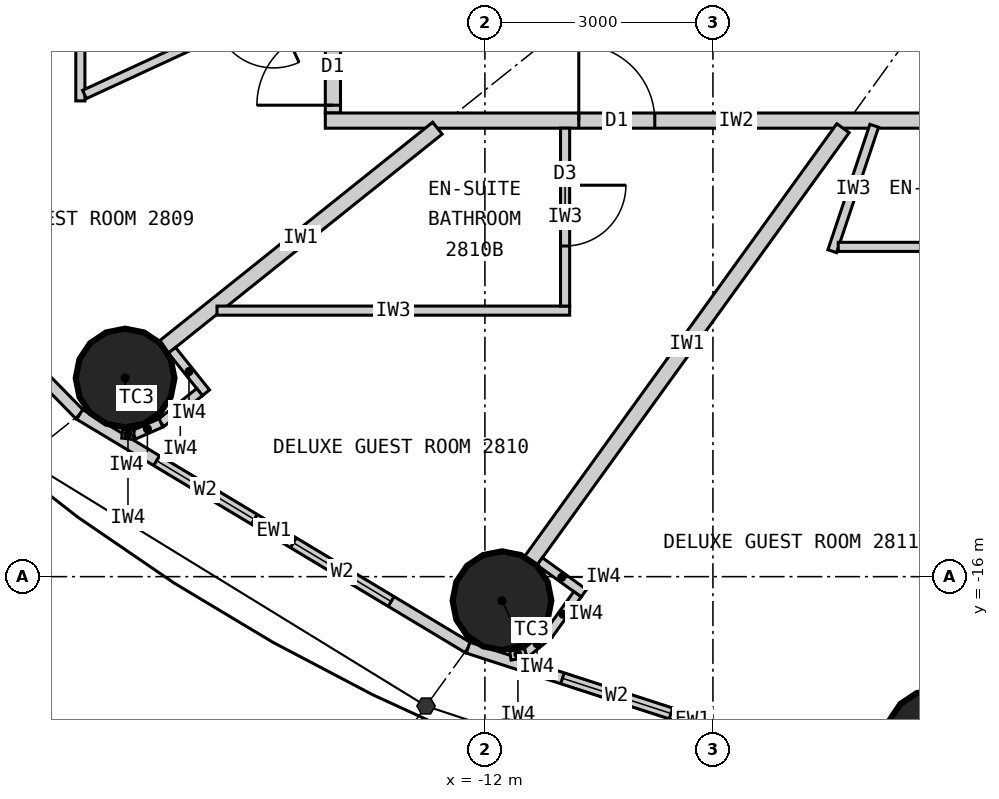
"""IFC4 building model, lengths in metres.
Left out: names, types, materials, properties, quantities, classifications, styles, units other than length and angle.
Written with IfcOpenShell. Run it as: python <this file> out.ifc"""

import sys

from ifc_helpers import new_model, si_unit, direction, frame, frame_2d, origin, origin_2d, place, context, subcontext, project, spatial, rectangle, circle, extrude, element, fill, save


model = new_model("IFC4")
c1 = context("Model", 3, precision=1e-05, world=origin(), true_north=direction((0.0, 1.0)))
c2 = subcontext(c1, "Body", "Model", "MODEL_VIEW")
j1 = project(units=[si_unit("LENGTHUNIT", "METRE"), si_unit("PLANEANGLEUNIT", "RADIAN")], contexts=[c1])
p1 = place(None, origin())
s1 = spatial("IfcSite", under=j1, at=p1, CompositionType="ELEMENT")
p2 = place(p1, origin())
s2 = spatial("IfcBuilding", under=s1, at=p2, CompositionType="ELEMENT")
p3 = place(p2, frame((0.0, 0.0, 112.2)))
s3 = spatial("IfcBuildingStorey", under=s2, at=p3, CompositionType="ELEMENT", Elevation=112.2)
for number, where, z_axis, x_axis in (
    (1, (-16.734, -13.387, 0.0), (0.0, 0.0, 1.0), (1.0, 0.0, 0.0)),
    (2, (-11.775, -16.316, 0.0), (0.0, 0.0, 1.0), (1.0, 0.0, 0.0)),
    (3, (-6.074, -18.135, 0.0), (0.0, 0.0, 1.0), (1.0, 0.0, 0.0)),
):
    element("IfcColumn", number, at=place(p3, frame(where, z_axis=z_axis, x_axis=x_axis)), inside=s3, PredefinedType="COLUMN", context=c2, shape_type="SweptSolid", body=[
        extrude(circle(Radius=0.65, at=origin_2d()), origin(), (0.0, 0.0, 1.0), 3.3),
    ])
p4 = place(p3, frame((-21.287, -9.832, 0.0), z_axis=(0.0, 0.0, 1.0), x_axis=(0.700136650834, -0.714008872605, 0.0)))
e4 = element("IfcWall", 4, at=p4, inside=s3, PredefinedType="ELEMENTEDWALL", context=c2, shape_type="SweptSolid", body=[
    extrude(rectangle(XDim=5.649, YDim=0.15, at=frame_2d((2.825, 0.0))), origin(), (0.0, 0.0, 1.0), 3.12),
])
p5 = place(p4, frame((1.025, 0.0, 0.9)))
e5 = element("IfcOpeningElement", 5, at=p5, cuts=e4, PredefinedType="OPENING", context=c2, shape_type="SweptSolid", body=[
    extrude(rectangle(XDim=1.5, YDim=1.9, at=frame_2d((0.75, 0.95))), frame((0.0, 0.085, 0.0), z_axis=(0.0, -1.0, 0.0), x_axis=(1.0, 0.0, 0.0)), (0.0, 0.0, 1.0), 0.17),
])
p6 = place(p4, frame((3.125, 0.0, 0.9)))
e6 = element("IfcOpeningElement", 6, at=p6, cuts=e4, PredefinedType="OPENING", context=c2, shape_type="SweptSolid", body=[
    extrude(rectangle(XDim=1.5, YDim=1.9, at=frame_2d((0.75, 0.95))), frame((0.0, 0.085, 0.0), z_axis=(0.0, -1.0, 0.0), x_axis=(1.0, 0.0, 0.0)), (0.0, 0.0, 1.0), 0.17),
])
p7 = place(p3, frame((-17.332, -13.866, 0.0), z_axis=(0.0, 0.0, 1.0), x_axis=(0.857308573723, -0.514802884044, 0.0)))
e7 = element("IfcWall", 7, at=p7, inside=s3, PredefinedType="ELEMENTEDWALL", context=c2, shape_type="SweptSolid", body=[
    extrude(rectangle(XDim=5.961, YDim=0.15, at=frame_2d((2.98, 0.0))), origin(), (0.0, 0.0, 1.0), 3.12),
])
p8 = place(p7, frame((1.181, 0.0, 0.9)))
e8 = element("IfcOpeningElement", 8, at=p8, cuts=e7, PredefinedType="OPENING", context=c2, shape_type="SweptSolid", body=[
    extrude(rectangle(XDim=1.5, YDim=1.9, at=frame_2d((0.75, 0.95))), frame((0.0, 0.085, 0.0), z_axis=(0.0, -1.0, 0.0), x_axis=(1.0, 0.0, 0.0)), (0.0, 0.0, 1.0), 0.17),
])
p9 = place(p7, frame((3.281, 0.0, 0.9)))
e9 = element("IfcOpeningElement", 9, at=p9, cuts=e7, PredefinedType="OPENING", context=c2, shape_type="SweptSolid", body=[
    extrude(rectangle(XDim=1.5, YDim=1.9, at=frame_2d((0.75, 0.95))), frame((0.0, 0.085, 0.0), z_axis=(0.0, -1.0, 0.0), x_axis=(1.0, 0.0, 0.0)), (0.0, 0.0, 1.0), 0.17),
])
p10 = place(p3, frame((-12.221, -16.935, 0.0), z_axis=(0.0, 0.0, 1.0), x_axis=(0.951272691506, -0.308350881944, 0.0)))
e10 = element("IfcWall", 10, at=p10, inside=s3, PredefinedType="ELEMENTEDWALL", context=c2, shape_type="SweptSolid", body=[
    extrude(rectangle(XDim=6.211, YDim=0.15, at=frame_2d((3.105, 0.0))), origin(), (0.0, 0.0, 1.0), 3.12),
])
p11 = place(p10, frame((1.305, 0.0, 0.9)))
e11 = element("IfcOpeningElement", 11, at=p11, cuts=e10, PredefinedType="OPENING", context=c2, shape_type="SweptSolid", body=[
    extrude(rectangle(XDim=1.5, YDim=1.9, at=frame_2d((0.75, 0.95))), frame((0.0, 0.085, 0.0), z_axis=(0.0, -1.0, 0.0), x_axis=(1.0, 0.0, 0.0)), (0.0, 0.0, 1.0), 0.17),
])
p12 = place(p10, frame((3.405, 0.0, 0.9)))
e12 = element("IfcOpeningElement", 12, at=p12, cuts=e10, PredefinedType="OPENING", context=c2, shape_type="SweptSolid", body=[
    extrude(rectangle(XDim=1.5, YDim=1.9, at=frame_2d((0.75, 0.95))), frame((0.0, 0.085, 0.0), z_axis=(0.0, -1.0, 0.0), x_axis=(1.0, 0.0, 0.0)), (0.0, 0.0, 1.0), 0.17),
])
p13 = place(p3, frame((-14.0, 9.9, 0.0), z_axis=(0.0, 0.0, 1.0), x_axis=(0.0, -1.0, 0.0)))
e13 = element("IfcWall", 13, at=p13, inside=s3, PredefinedType="PARTITIONING", context=c2, shape_type="SweptSolid", body=[
    extrude(rectangle(XDim=19.8, YDim=0.2, at=frame_2d((9.9, 0.0))), origin(), (0.0, 0.0, 1.0), 3.12),
])
p14 = place(p13, frame((3.622, 0.0, 0.0)))
e14 = element("IfcOpeningElement", 14, at=p14, cuts=e13, PredefinedType="OPENING", context=c2, shape_type="SweptSolid", body=[
    extrude(rectangle(XDim=1.0, YDim=2.2, at=frame_2d((0.5, 1.1))), frame((0.0, 0.11, 0.0), z_axis=(0.0, -1.0, 0.0), x_axis=(1.0, 0.0, 0.0)), (0.0, 0.0, 1.0), 0.22),
])
p15 = place(p13, frame((9.238, 0.0, 0.0)))
e15 = element("IfcOpeningElement", 15, at=p15, cuts=e13, PredefinedType="OPENING", context=c2, shape_type="SweptSolid", body=[
    extrude(rectangle(XDim=1.0, YDim=2.2, at=frame_2d((0.5, 1.1))), frame((0.0, 0.11, 0.0), z_axis=(0.0, -1.0, 0.0), x_axis=(1.0, 0.0, 0.0)), (0.0, 0.0, 1.0), 0.22),
])
p16 = place(p13, frame((13.742, 0.0, 0.0)))
e16 = element("IfcOpeningElement", 16, at=p16, cuts=e13, PredefinedType="OPENING", context=c2, shape_type="SweptSolid", body=[
    extrude(rectangle(XDim=1.0, YDim=2.2, at=frame_2d((0.5, 1.1))), frame((0.0, 0.11, 0.0), z_axis=(0.0, -1.0, 0.0), x_axis=(1.0, 0.0, 0.0)), (0.0, 0.0, 1.0), 0.22),
])
p17 = place(p13, frame((18.698, 0.0, 0.0)))
e17 = element("IfcOpeningElement", 17, at=p17, cuts=e13, PredefinedType="OPENING", context=c2, shape_type="SweptSolid", body=[
    extrude(rectangle(XDim=1.0, YDim=2.2, at=frame_2d((0.5, 1.1))), frame((0.0, 0.11, 0.0), z_axis=(0.0, -1.0, 0.0), x_axis=(1.0, 0.0, 0.0)), (0.0, 0.0, 1.0), 0.22),
])
p18 = place(p3, frame((-3.283, -10.0, 0.0), z_axis=(0.0, 0.0, 1.0), x_axis=(-1.0, 0.0, 0.0)))
e18 = element("IfcWall", 18, at=p18, inside=s3, PredefinedType="PARTITIONING", context=c2, shape_type="SweptSolid", body=[
    extrude(rectangle(XDim=10.817, YDim=0.2, at=frame_2d((5.409, 0.0))), origin(), (0.0, 0.0, 1.0), 3.12),
])
p19 = place(p18, frame((6.482, 0.0, 0.0)))
e19 = element("IfcOpeningElement", 19, at=p19, cuts=e18, PredefinedType="OPENING", context=c2, shape_type="SweptSolid", body=[
    extrude(rectangle(XDim=1.0, YDim=2.2, at=frame_2d((0.5, 1.1))), frame((0.0, 0.11, 0.0), z_axis=(0.0, -1.0, 0.0), x_axis=(1.0, 0.0, 0.0)), (0.0, 0.0, 1.0), 0.22),
])
p20 = place(p3, frame((-14.1, -6.512, 0.0), z_axis=(0.0, 0.0, 1.0), x_axis=(-0.907833019998, -0.419331858797, 0.0)))
e20 = element("IfcWall", 20, at=p20, inside=s3, PredefinedType="PARTITIONING", context=c2, shape_type="SweptSolid", body=[
    extrude(rectangle(XDim=6.505, YDim=0.2, at=frame_2d((3.252, 0.0))), origin(), (0.0, 0.0, 1.0), 2.27),
])
p21 = place(p3, frame((-12.625, -10.1, 0.0), z_axis=(0.0, 0.0, 1.0), x_axis=(-0.780863644897, -0.624701503182, 0.0)))
e21 = element("IfcWall", 21, at=p21, inside=s3, PredefinedType="PARTITIONING", context=c2, shape_type="SweptSolid", body=[
    extrude(rectangle(XDim=4.612, YDim=0.2, at=frame_2d((2.306, 0.0))), origin(), (0.0, 0.0, 1.0), 2.37),
])
p22 = place(p3, frame((-7.289, -10.1, 0.0), z_axis=(0.0, 0.0, 1.0), x_axis=(-0.585217367024, -0.81087645997, 0.0)))
e22 = element("IfcWall", 22, at=p22, inside=s3, PredefinedType="PARTITIONING", context=c2, shape_type="SweptSolid", body=[
    extrude(rectangle(XDim=7.016, YDim=0.2, at=frame_2d((3.508, 0.0))), origin(), (0.0, 0.0, 1.0), 2.37),
])
p23 = place(p3, frame((-17.323, -8.101, 0.0), z_axis=(0.0, 0.0, 1.0), x_axis=(0.0, -1.0, 0.0)))
e23 = element("IfcWall", 23, at=p23, inside=s3, PredefinedType="PARTITIONING", context=c2, shape_type="SweptSolid", body=[
    extrude(rectangle(XDim=1.64, YDim=0.12, at=frame_2d((0.82, 0.0))), origin(), (0.0, 0.0, 1.0), 3.12),
])
p24 = place(p3, frame((-14.1, -8.193, 0.0), z_axis=(0.0, 0.0, 1.0), x_axis=(-0.907836493557, -0.419324338628, 0.0)))
e24 = element("IfcWall", 24, at=p24, inside=s3, PredefinedType="PARTITIONING", context=c2, shape_type="SweptSolid", body=[
    extrude(rectangle(XDim=3.49, YDim=0.12, at=frame_2d((1.745, 0.0))), origin(), (0.0, 0.0, 1.0), 3.12),
])
p25 = place(p24, frame((0.75, 0.0, 0.0)))
e25 = element("IfcOpeningElement", 25, at=p25, cuts=e24, PredefinedType="OPENING", context=c2, shape_type="SweptSolid", body=[
    extrude(rectangle(XDim=0.8, YDim=2.1, at=frame_2d((0.4, 1.05))), frame((0.0, 0.07, 0.0), z_axis=(0.0, -1.0, 0.0), x_axis=(1.0, 0.0, 0.0)), (0.0, 0.0, 1.0), 0.14),
])
p26 = place(p3, frame((-15.525, -12.5, 0.0), z_axis=(0.0, 0.0, 1.0), x_axis=(1.0, 0.0, 0.0)))
e26 = element("IfcWall", 26, at=p26, inside=s3, PredefinedType="PARTITIONING", context=c2, shape_type="SweptSolid", body=[
    extrude(rectangle(XDim=4.64, YDim=0.12, at=frame_2d((2.32, 0.0))), origin(), (0.0, 0.0, 1.0), 3.12),
])
p27 = place(p3, frame((-10.945, -10.1, 0.0), z_axis=(0.0, 0.0, 1.0), x_axis=(0.0, -1.0, 0.0)))
e27 = element("IfcWall", 27, at=p27, inside=s3, PredefinedType="PARTITIONING", context=c2, shape_type="SweptSolid", body=[
    extrude(rectangle(XDim=2.34, YDim=0.12, at=frame_2d((1.17, 0.0))), origin(), (0.0, 0.0, 1.0), 3.12),
])
p28 = place(p27, frame((0.75, 0.0, 0.0)))
e28 = element("IfcOpeningElement", 28, at=p28, cuts=e27, PredefinedType="OPENING", context=c2, shape_type="SweptSolid", body=[
    extrude(rectangle(XDim=0.8, YDim=2.1, at=frame_2d((0.4, 1.05))), frame((0.0, 0.07, 0.0), z_axis=(0.0, -1.0, 0.0), x_axis=(1.0, 0.0, 0.0)), (0.0, 0.0, 1.0), 0.14),
])
p29 = place(p3, frame((-6.878, -10.068, 0.0), z_axis=(0.0, 0.0, 1.0), x_axis=(-0.317532394508, -0.948247424694, 0.0)))
e29 = element("IfcWall", 29, at=p29, inside=s3, PredefinedType="PARTITIONING", context=c2, shape_type="SweptSolid", body=[
    extrude(rectangle(XDim=1.74, YDim=0.12, at=frame_2d((0.87, 0.0))), origin(), (0.0, 0.0, 1.0), 3.12),
])
p30 = place(p3, frame((-4.011, -11.661, 0.0), z_axis=(0.0, 0.0, 1.0), x_axis=(-1.0, 0.0, 0.0)))
e30 = element("IfcWall", 30, at=p30, inside=s3, PredefinedType="PARTITIONING", context=c2, shape_type="SweptSolid", body=[
    extrude(rectangle(XDim=3.34, YDim=0.12, at=frame_2d((1.67, 0.0))), origin(), (0.0, 0.0, 1.0), 3.12),
])
p31 = place(p30, frame((0.75, 0.0, 0.0)))
e31 = element("IfcOpeningElement", 31, at=p31, cuts=e30, PredefinedType="OPENING", context=c2, shape_type="SweptSolid", body=[
    extrude(rectangle(XDim=0.8, YDim=2.1, at=frame_2d((0.4, 1.05))), frame((0.0, 0.07, 0.0), z_axis=(0.0, -1.0, 0.0), x_axis=(1.0, 0.0, 0.0)), (0.0, 0.0, 1.0), 0.14),
])
p32 = place(p3, frame((-16.117, -13.022, 0.0), z_axis=(0.0, 0.0, 1.0), x_axis=(0.62465344249, -0.780902091677, 0.0)))
e32 = element("IfcWall", 32, at=p32, inside=s3, PredefinedType="PARTITIONING", context=c2, shape_type="SweptSolid", body=[
    extrude(rectangle(XDim=0.716, YDim=0.12, at=frame_2d((0.358, 0.0))), origin(), (0.0, 0.0, 1.0), 3.12),
])
p33 = place(p3, frame((-15.754, -13.571, 0.0), z_axis=(0.0, 0.0, 1.0), x_axis=(-0.780905453553, -0.624649239663, 0.0)))
e33 = element("IfcWall", 33, at=p33, inside=s3, PredefinedType="PARTITIONING", context=c2, shape_type="SweptSolid", body=[
    extrude(rectangle(XDim=0.65, YDim=0.12, at=frame_2d((0.325, 0.0))), origin(), (0.0, 0.0, 1.0), 3.12),
])
p34 = place(p3, frame((-16.262, -13.977, 0.0), z_axis=(0.0, 0.0, 1.0), x_axis=(-0.915985403703, -0.401211590314, 0.0)))
e34 = element("IfcWall", 34, at=p34, inside=s3, PredefinedType="PARTITIONING", context=c2, shape_type="SweptSolid", body=[
    extrude(rectangle(XDim=0.391, YDim=0.12, at=frame_2d((0.196, 0.0))), origin(), (0.0, 0.0, 1.0), 3.12),
])
p35 = place(p3, frame((-16.62, -14.134, 0.0), z_axis=(0.0, 0.0, 1.0), x_axis=(-0.993941871493, 0.109907033867, 0.0)))
e35 = element("IfcWall", 35, at=p35, inside=s3, PredefinedType="PARTITIONING", context=c2, shape_type="SweptSolid", body=[
    extrude(rectangle(XDim=0.153, YDim=0.12, at=frame_2d((0.077, 0.0))), origin(), (0.0, 0.0, 1.0), 3.12),
])
p36 = place(p3, frame((-11.279, -15.799, 0.0), z_axis=(0.0, 0.0, 1.0), x_axis=(0.810912957127, -0.585166793285, 0.0)))
e36 = element("IfcWall", 36, at=p36, inside=s3, PredefinedType="PARTITIONING", context=c2, shape_type="SweptSolid", body=[
    extrude(rectangle(XDim=0.716, YDim=0.12, at=frame_2d((0.358, 0.0))), origin(), (0.0, 0.0, 1.0), 3.12),
])
p37 = place(p3, frame((-10.782, -16.231, 0.0), z_axis=(0.0, 0.0, 1.0), x_axis=(-0.585175102182, -0.810906961239, 0.0)))
e37 = element("IfcWall", 37, at=p37, inside=s3, PredefinedType="PARTITIONING", context=c2, shape_type="SweptSolid", body=[
    extrude(rectangle(XDim=0.65, YDim=0.12, at=frame_2d((0.325, 0.0))), origin(), (0.0, 0.0, 1.0), 3.12),
])
p38 = place(p3, frame((-11.162, -16.759, 0.0), z_axis=(0.0, 0.0, 1.0), x_axis=(-0.775178428527, -0.63174235567, 0.0)))
e38 = element("IfcWall", 38, at=p38, inside=s3, PredefinedType="PARTITIONING", context=c2, shape_type="SweptSolid", body=[
    extrude(rectangle(XDim=0.392, YDim=0.12, at=frame_2d((0.196, 0.0))), origin(), (0.0, 0.0, 1.0), 3.12),
])
p39 = place(p3, frame((-11.466, -17.006, 0.0), z_axis=(0.0, 0.0, 1.0), x_axis=(-0.987228877621, -0.15930832744, 0.0)))
e39 = element("IfcWall", 39, at=p39, inside=s3, PredefinedType="PARTITIONING", context=c2, shape_type="SweptSolid", body=[
    extrude(rectangle(XDim=0.202, YDim=0.12, at=frame_2d((0.101, 0.0))), origin(), (0.0, 0.0, 1.0), 3.12),
])
p40 = place(p8, origin())
e40 = element("IfcWindow", 40, at=p40, inside=s3, PartitioningType="SINGLE_PANEL", PredefinedType="WINDOW", context=c2, shape_type="SweptSolid", body=[
    extrude(rectangle(XDim=1.5, YDim=1.9, at=frame_2d((0.75, 0.95))), frame((0.0, 0.03, 0.0), z_axis=(0.0, -1.0, 0.0), x_axis=(1.0, 0.0, 0.0)), (0.0, 0.0, 1.0), 0.06),
])
fill(e8, e40)
p41 = place(p9, origin())
e41 = element("IfcWindow", 41, at=p41, inside=s3, PartitioningType="SINGLE_PANEL", PredefinedType="WINDOW", context=c2, shape_type="SweptSolid", body=[
    extrude(rectangle(XDim=1.5, YDim=1.9, at=frame_2d((0.75, 0.95))), frame((0.0, 0.03, 0.0), z_axis=(0.0, -1.0, 0.0), x_axis=(1.0, 0.0, 0.0)), (0.0, 0.0, 1.0), 0.06),
])
fill(e9, e41)
p42 = place(p11, origin())
e42 = element("IfcWindow", 42, at=p42, inside=s3, PartitioningType="SINGLE_PANEL", PredefinedType="WINDOW", context=c2, shape_type="SweptSolid", body=[
    extrude(rectangle(XDim=1.5, YDim=1.9, at=frame_2d((0.75, 0.95))), frame((0.0, 0.03, 0.0), z_axis=(0.0, -1.0, 0.0), x_axis=(1.0, 0.0, 0.0)), (0.0, 0.0, 1.0), 0.06),
])
fill(e11, e42)
p43 = place(p17, origin())
e43 = element("IfcDoor", 43, at=p43, inside=s3, OperationType="SINGLE_SWING_RIGHT", PredefinedType="DOOR", context=c2, shape_type="SweptSolid", body=[
    extrude(rectangle(XDim=1.0, YDim=2.2, at=frame_2d((0.5, 1.1))), frame((0.0, 0.025, 0.0), z_axis=(0.0, -1.0, 0.0), x_axis=(1.0, 0.0, 0.0)), (0.0, 0.0, 1.0), 0.05),
])
fill(e17, e43)
p44 = place(p28, origin())
e44 = element("IfcDoor", 44, at=p44, inside=s3, OperationType="SINGLE_SWING_LEFT", PredefinedType="DOOR", context=c2, shape_type="SweptSolid", body=[
    extrude(rectangle(XDim=0.8, YDim=2.1, at=frame_2d((0.4, 1.05))), frame((0.0, 0.025, 0.0), z_axis=(0.0, -1.0, 0.0), x_axis=(1.0, 0.0, 0.0)), (0.0, 0.0, 1.0), 0.05),
])
fill(e28, e44)
p45 = place(p19, origin())
e45 = element("IfcDoor", 45, at=p45, inside=s3, OperationType="SINGLE_SWING_RIGHT", PredefinedType="DOOR", context=c2, shape_type="SweptSolid", body=[
    extrude(rectangle(XDim=1.0, YDim=2.2, at=frame_2d((0.5, 1.1))), frame((0.0, 0.025, 0.0), z_axis=(0.0, -1.0, 0.0), x_axis=(1.0, 0.0, 0.0)), (0.0, 0.0, 1.0), 0.05),
])
fill(e19, e45)
save(model, sys.argv[1])
